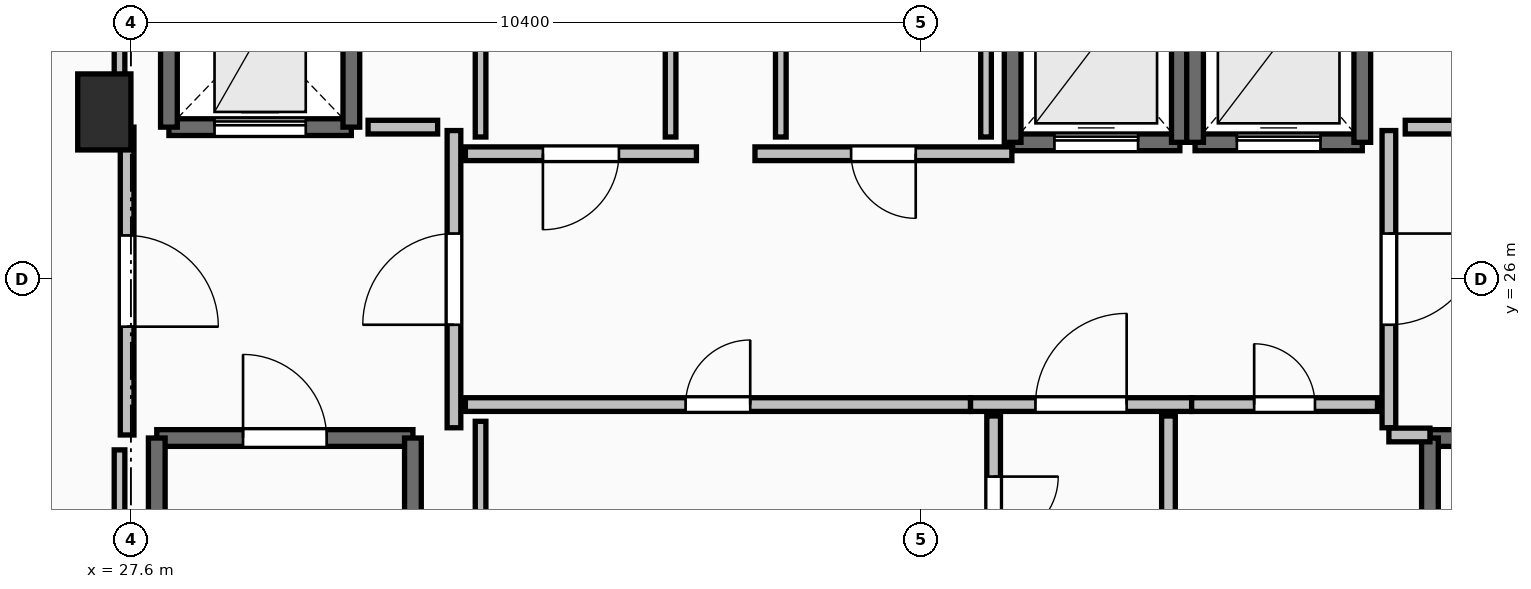
"""IFC4 building model, lengths in metres.
Left out: names, types, materials, properties, quantities, classifications, styles, units other than length and angle.
Written with IfcOpenShell. Run it as: python <this file> out.ifc"""

import sys

from ifc_helpers import new_model, si_unit, direction, frame, frame_2d, origin, origin_2d, place, context, subcontext, project, spatial, rectangle, extrude, element, fill, save


model = new_model("IFC4")
c1 = context("Model", 3, precision=1e-05, world=origin(), true_north=direction((0.0, 1.0)))
c2 = subcontext(c1, "Body", "Model", "MODEL_VIEW")
j1 = project(units=[si_unit("LENGTHUNIT", "METRE"), si_unit("PLANEANGLEUNIT", "RADIAN")], contexts=[c1])
p1 = place(None, origin())
s1 = spatial("IfcSite", under=j1, at=p1, CompositionType="ELEMENT")
p2 = place(p1, origin())
s2 = spatial("IfcBuilding", under=s1, at=p2, CompositionType="ELEMENT")
p3 = place(p2, frame((0.0, 0.0, 234.25)))
s3 = spatial("IfcBuildingStorey", under=s2, at=p3, CompositionType="ELEMENT", Elevation=234.25)
p4 = place(p3, frame((27.25, 28.2, 0.0), z_axis=(0.0, 0.0, 1.0), x_axis=(1.0, 0.0, 0.0)))
e1 = element("IfcColumn", 1, at=p4, inside=s3, PredefinedType="PILASTER", context=c2, shape_type="SweptSolid", body=[
    extrude(rectangle(XDim=0.7, YDim=1.0, at=origin_2d()), origin(), (0.0, 0.0, 1.0), 3.55),
])
p5 = place(p3, frame((27.94, 23.91, 0.0), z_axis=(0.0, 0.0, 1.0), x_axis=(1.0, 0.0, 0.0)))
e2 = element("IfcWall", 2, at=p5, inside=s3, PredefinedType="SOLIDWALL", context=c2, shape_type="SweptSolid", body=[
    extrude(rectangle(XDim=3.37, YDim=0.22, at=frame_2d((1.685, 0.0))), origin(), (0.0, 0.0, 1.0), 3.29),
])
p6 = place(p5, frame((1.135, 0.0, 0.0)))
e3 = element("IfcOpeningElement", 3, at=p6, cuts=e2, PredefinedType="OPENING", context=c2, shape_type="SweptSolid", body=[
    extrude(rectangle(XDim=1.1, YDim=2.15, at=frame_2d((0.55, 1.075))), frame((0.0, 0.125, 0.0), z_axis=(0.0, -1.0, 0.0), x_axis=(1.0, 0.0, 0.0)), (0.0, 0.0, 1.0), 0.25),
])
for number, where, z_axis, x_axis in (
    (4, (31.31, 23.91, 0.0), (0.0, 0.0, 1.0), (0.0, -1.0, 0.0)),
    (5, (27.94, 16.49, 0.0), (0.0, 0.0, 1.0), (0.0, 1.0, 0.0)),
):
    element("IfcWall", number, at=place(p3, frame(where, z_axis=z_axis, x_axis=x_axis)), inside=s3, PredefinedType="SOLIDWALL", context=c2, shape_type="SweptSolid", body=[
        extrude(rectangle(XDim=7.42, YDim=0.22, at=frame_2d((3.71, 0.0))), origin(), (0.0, 0.0, 1.0), 3.29),
    ])
p7 = place(p3, frame((44.69, 23.91, 0.0), z_axis=(0.0, 0.0, 1.0), x_axis=(1.0, 0.0, 0.0)))
e6 = element("IfcWall", 6, at=p7, inside=s3, PredefinedType="SOLIDWALL", context=c2, shape_type="SweptSolid", body=[
    extrude(rectangle(XDim=3.37, YDim=0.22, at=frame_2d((1.685, 0.0))), origin(), (0.0, 0.0, 1.0), 3.29),
])
p8 = place(p7, frame((1.135, 0.0, 0.0)))
e7 = element("IfcOpeningElement", 7, at=p8, cuts=e6, PredefinedType="OPENING", context=c2, shape_type="SweptSolid", body=[
    extrude(rectangle(XDim=1.1, YDim=2.15, at=frame_2d((0.55, 1.075))), frame((0.0, 0.125, 0.0), z_axis=(0.0, -1.0, 0.0), x_axis=(1.0, 0.0, 0.0)), (0.0, 0.0, 1.0), 0.25),
])
p9 = place(p3, frame((44.69, 16.49, 0.0), z_axis=(0.0, 0.0, 1.0), x_axis=(0.0, 1.0, 0.0)))
e8 = element("IfcWall", 8, at=p9, inside=s3, PredefinedType="SOLIDWALL", context=c2, shape_type="SweptSolid", body=[
    extrude(rectangle(XDim=7.42, YDim=0.22, at=frame_2d((3.71, 0.0))), origin(), (0.0, 0.0, 1.0), 3.29),
])
p10 = place(p3, frame((39.2, 27.8, 0.0), z_axis=(0.0, 0.0, 1.0), x_axis=(1.0, 0.0, 0.0)))
e9 = element("IfcWall", 9, at=p10, inside=s3, PredefinedType="SOLIDWALL", context=c2, shape_type="SweptSolid", body=[
    extrude(rectangle(XDim=2.2, YDim=0.22, at=frame_2d((1.1, 0.0))), origin(), (0.0, 0.0, 1.0), 3.29),
])
p11 = place(p10, frame((0.55, 0.0, 0.0)))
e10 = element("IfcOpeningElement", 10, at=p11, cuts=e9, PredefinedType="OPENING", context=c2, shape_type="SweptSolid", body=[
    extrude(rectangle(XDim=1.1, YDim=2.2, at=frame_2d((0.55, 1.1))), frame((0.0, 0.125, 0.0), z_axis=(0.0, -1.0, 0.0), x_axis=(1.0, 0.0, 0.0)), (0.0, 0.0, 1.0), 0.25),
])
for number, where, z_axis, x_axis in (
    (11, (41.4, 27.8, 0.0), (0.0, 0.0, 1.0), (0.0, 1.0, 0.0)),
    (12, (39.2, 30.4, 0.0), (0.0, 0.0, 1.0), (0.0, -1.0, 0.0)),
):
    element("IfcWall", number, at=place(p3, frame(where, z_axis=z_axis, x_axis=x_axis)), inside=s3, PredefinedType="SOLIDWALL", context=c2, shape_type="SweptSolid", body=[
        extrude(rectangle(XDim=2.6, YDim=0.22, at=frame_2d((1.3, 0.0))), origin(), (0.0, 0.0, 1.0), 3.29),
    ])
p12 = place(p3, frame((41.6, 27.8, 0.0), z_axis=(0.0, 0.0, 1.0), x_axis=(1.0, 0.0, 0.0)))
e13 = element("IfcWall", 13, at=p12, inside=s3, PredefinedType="SOLIDWALL", context=c2, shape_type="SweptSolid", body=[
    extrude(rectangle(XDim=2.2, YDim=0.22, at=frame_2d((1.1, 0.0))), origin(), (0.0, 0.0, 1.0), 3.29),
])
p13 = place(p12, frame((0.55, 0.0, 0.0)))
e14 = element("IfcOpeningElement", 14, at=p13, cuts=e13, PredefinedType="OPENING", context=c2, shape_type="SweptSolid", body=[
    extrude(rectangle(XDim=1.1, YDim=2.2, at=frame_2d((0.55, 1.1))), frame((0.0, 0.125, 0.0), z_axis=(0.0, -1.0, 0.0), x_axis=(1.0, 0.0, 0.0)), (0.0, 0.0, 1.0), 0.25),
])
for number, where, z_axis, x_axis in (
    (15, (43.8, 27.8, 0.0), (0.0, 0.0, 1.0), (0.0, 1.0, 0.0)),
    (16, (41.6, 30.4, 0.0), (0.0, 0.0, 1.0), (0.0, -1.0, 0.0)),
):
    element("IfcWall", number, at=place(p3, frame(where, z_axis=z_axis, x_axis=x_axis)), inside=s3, PredefinedType="SOLIDWALL", context=c2, shape_type="SweptSolid", body=[
        extrude(rectangle(XDim=2.6, YDim=0.22, at=frame_2d((1.3, 0.0))), origin(), (0.0, 0.0, 1.0), 3.29),
    ])
p14 = place(p3, frame((28.1, 28.0, 0.0), z_axis=(0.0, 0.0, 1.0), x_axis=(1.0, 0.0, 0.0)))
e17 = element("IfcWall", 17, at=p14, inside=s3, PredefinedType="SHEAR", context=c2, shape_type="SweptSolid", body=[
    extrude(rectangle(XDim=2.4, YDim=0.22, at=frame_2d((1.2, 0.0))), origin(), (0.0, 0.0, 1.0), 3.29),
])
p15 = place(p14, frame((0.6, 0.0, 0.0)))
e18 = element("IfcOpeningElement", 18, at=p15, cuts=e17, PredefinedType="OPENING", context=c2, shape_type="SweptSolid", body=[
    extrude(rectangle(XDim=1.2, YDim=2.2, at=frame_2d((0.6, 1.1))), frame((0.0, 0.125, 0.0), z_axis=(0.0, -1.0, 0.0), x_axis=(1.0, 0.0, 0.0)), (0.0, 0.0, 1.0), 0.25),
])
for number, where, z_axis, x_axis in (
    (19, (30.5, 28.0, 0.0), (0.0, 0.0, 1.0), (0.0, 1.0, 0.0)),
    (20, (28.1, 30.5, 0.0), (0.0, 0.0, 1.0), (0.0, -1.0, 0.0)),
):
    element("IfcWall", number, at=place(p3, frame(where, z_axis=z_axis, x_axis=x_axis)), inside=s3, PredefinedType="SHEAR", context=c2, shape_type="SweptSolid", body=[
        extrude(rectangle(XDim=2.5, YDim=0.22, at=frame_2d((1.25, 0.0))), origin(), (0.0, 0.0, 1.0), 3.29),
    ])
p16 = place(p3, frame((31.85, 24.045, 0.0), z_axis=(0.0, 0.0, 1.0), x_axis=(0.0, 1.0, 0.0)))
e21 = element("IfcWall", 21, at=p16, inside=s3, PredefinedType="PARTITIONING", context=c2, shape_type="SweptSolid", body=[
    extrude(rectangle(XDim=3.91, YDim=0.18, at=frame_2d((1.955, 0.0))), origin(), (0.0, 0.0, 1.0), 3.29),
])
p17 = place(p16, frame((1.355, 0.0, 0.0)))
e22 = element("IfcOpeningElement", 22, at=p17, cuts=e21, PredefinedType="OPENING", context=c2, shape_type="SweptSolid", body=[
    extrude(rectangle(XDim=1.2, YDim=2.15, at=frame_2d((0.6, 1.075))), frame((0.0, 0.105, 0.0), z_axis=(0.0, -1.0, 0.0), x_axis=(1.0, 0.0, 0.0)), (0.0, 0.0, 1.0), 0.21),
])
p18 = place(p3, frame((27.55, 28.0, 0.0), z_axis=(0.0, 0.0, 1.0), x_axis=(0.0, -1.0, 0.0)))
e23 = element("IfcWall", 23, at=p18, inside=s3, PredefinedType="PARTITIONING", context=c2, shape_type="SweptSolid", body=[
    extrude(rectangle(XDim=4.05, YDim=0.18, at=frame_2d((2.025, 0.0))), origin(), (0.0, 0.0, 1.0), 3.29),
])
p19 = place(p18, frame((1.425, 0.0, 0.0)))
e24 = element("IfcOpeningElement", 24, at=p19, cuts=e23, PredefinedType="OPENING", context=c2, shape_type="SweptSolid", body=[
    extrude(rectangle(XDim=1.2, YDim=2.15, at=frame_2d((0.6, 1.075))), frame((0.0, 0.105, 0.0), z_axis=(0.0, -1.0, 0.0), x_axis=(1.0, 0.0, 0.0)), (0.0, 0.0, 1.0), 0.21),
])
p20 = place(p3, frame((44.15, 27.955, 0.0), z_axis=(0.0, 0.0, 1.0), x_axis=(0.0, -1.0, 0.0)))
e25 = element("IfcWall", 25, at=p20, inside=s3, PredefinedType="PARTITIONING", context=c2, shape_type="SweptSolid", body=[
    extrude(rectangle(XDim=3.91, YDim=0.18, at=frame_2d((1.955, 0.0))), origin(), (0.0, 0.0, 1.0), 3.29),
])
p21 = place(p20, frame((1.355, 0.0, 0.0)))
e26 = element("IfcOpeningElement", 26, at=p21, cuts=e25, PredefinedType="OPENING", context=c2, shape_type="SweptSolid", body=[
    extrude(rectangle(XDim=1.2, YDim=2.15, at=frame_2d((0.6, 1.075))), frame((0.0, 0.105, 0.0), z_axis=(0.0, -1.0, 0.0), x_axis=(1.0, 0.0, 0.0)), (0.0, 0.0, 1.0), 0.21),
])
p22 = place(p3, frame((44.15, 23.95, 0.0), z_axis=(0.0, 0.0, 1.0), x_axis=(1.0, 0.0, 0.0)))
e27 = element("IfcWall", 27, at=p22, inside=s3, PredefinedType="PARTITIONING", context=c2, shape_type="SweptSolid", body=[
    extrude(rectangle(XDim=0.54, YDim=0.18, at=frame_2d((0.27, 0.0))), origin(), (0.0, 0.0, 1.0), 3.29),
])
p23 = place(p3, frame((38.645, 24.35, 0.0), z_axis=(0.0, 0.0, 1.0), x_axis=(1.0, 0.0, 0.0)))
e28 = element("IfcWall", 28, at=p23, inside=s3, PredefinedType="PARTITIONING", context=c2, shape_type="SweptSolid", body=[
    extrude(rectangle(XDim=2.91, YDim=0.18, at=frame_2d((1.455, 0.0))), origin(), (0.0, 0.0, 1.0), 3.29),
])
p24 = place(p23, frame((0.855, 0.0, 0.0)))
e29 = element("IfcOpeningElement", 29, at=p24, cuts=e28, PredefinedType="OPENING", context=c2, shape_type="SweptSolid", body=[
    extrude(rectangle(XDim=1.2, YDim=2.15, at=frame_2d((0.6, 1.075))), frame((0.0, 0.105, 0.0), z_axis=(0.0, -1.0, 0.0), x_axis=(1.0, 0.0, 0.0)), (0.0, 0.0, 1.0), 0.21),
])
p25 = place(p3, frame((41.555, 24.35, 0.0), z_axis=(0.0, 0.0, 1.0), x_axis=(1.0, 0.0, 0.0)))
e30 = element("IfcWall", 30, at=p25, inside=s3, PredefinedType="PARTITIONING", context=c2, shape_type="SweptSolid", body=[
    extrude(rectangle(XDim=2.445, YDim=0.18, at=frame_2d((1.223, 0.0))), origin(), (0.0, 0.0, 1.0), 3.29),
])
p26 = place(p25, frame((0.823, 0.0, 0.0)))
e31 = element("IfcOpeningElement", 31, at=p26, cuts=e30, PredefinedType="OPENING", context=c2, shape_type="SweptSolid", body=[
    extrude(rectangle(XDim=0.8, YDim=2.05, at=frame_2d((0.4, 1.025))), frame((0.0, 0.105, 0.0), z_axis=(0.0, -1.0, 0.0), x_axis=(1.0, 0.0, 0.0)), (0.0, 0.0, 1.0), 0.21),
])
p27 = place(p3, frame((35.04, 27.65, 0.0), z_axis=(0.0, 0.0, 1.0), x_axis=(-1.0, 0.0, 0.0)))
e32 = element("IfcWall", 32, at=p27, inside=s3, PredefinedType="PARTITIONING", context=c2, shape_type="SweptSolid", body=[
    extrude(rectangle(XDim=3.04, YDim=0.18, at=frame_2d((1.52, 0.0))), origin(), (0.0, 0.0, 1.0), 3.29),
])
p28 = place(p27, frame((1.02, 0.0, 0.0)))
e33 = element("IfcOpeningElement", 33, at=p28, cuts=e32, PredefinedType="OPENING", context=c2, shape_type="SweptSolid", body=[
    extrude(rectangle(XDim=1.0, YDim=2.15, at=frame_2d((0.5, 1.075))), frame((0.0, 0.105, 0.0), z_axis=(0.0, -1.0, 0.0), x_axis=(1.0, 0.0, 0.0)), (0.0, 0.0, 1.0), 0.21),
])
p29 = place(p3, frame((39.19, 27.65, 0.0), z_axis=(0.0, 0.0, 1.0), x_axis=(-1.0, 0.0, 0.0)))
e34 = element("IfcWall", 34, at=p29, inside=s3, PredefinedType="PARTITIONING", context=c2, shape_type="SweptSolid", body=[
    extrude(rectangle(XDim=3.38, YDim=0.18, at=frame_2d((1.69, 0.0))), origin(), (0.0, 0.0, 1.0), 3.29),
])
p30 = place(p29, frame((1.265, 0.0, 0.0)))
e35 = element("IfcOpeningElement", 35, at=p30, cuts=e34, PredefinedType="OPENING", context=c2, shape_type="SweptSolid", body=[
    extrude(rectangle(XDim=0.85, YDim=2.1, at=frame_2d((0.425, 1.05))), frame((0.0, 0.105, 0.0), z_axis=(0.0, -1.0, 0.0), x_axis=(1.0, 0.0, 0.0)), (0.0, 0.0, 1.0), 0.21),
])
p31 = place(p3, frame((32.0, 24.35, 0.0), z_axis=(0.0, 0.0, 1.0), x_axis=(1.0, 0.0, 0.0)))
e36 = element("IfcWall", 36, at=p31, inside=s3, PredefinedType="PARTITIONING", context=c2, shape_type="SweptSolid", body=[
    extrude(rectangle(XDim=6.645, YDim=0.18, at=frame_2d((3.323, 0.0))), origin(), (0.0, 0.0, 1.0), 3.29),
])
p32 = place(p31, frame((2.897, 0.0, 0.0)))
e37 = element("IfcOpeningElement", 37, at=p32, cuts=e36, PredefinedType="OPENING", context=c2, shape_type="SweptSolid", body=[
    extrude(rectangle(XDim=0.85, YDim=2.1, at=frame_2d((0.425, 1.05))), frame((0.0, 0.105, 0.0), z_axis=(0.0, -1.0, 0.0), x_axis=(1.0, 0.0, 0.0)), (0.0, 0.0, 1.0), 0.21),
])
p33 = place(p3, frame((41.25, 16.32, 0.0), z_axis=(0.0, 0.0, 1.0), x_axis=(0.0, 1.0, 0.0)))
e38 = element("IfcWall", 38, at=p33, inside=s3, PredefinedType="PARTITIONING", context=c2, shape_type="SweptSolid", body=[
    extrude(rectangle(XDim=7.88, YDim=0.18, at=frame_2d((3.94, 0.0))), origin(), (0.0, 0.0, 1.0), 2.482),
])
p34 = place(p33, frame((3.54, 0.0, 0.0)))
e39 = element("IfcOpeningElement", 39, at=p34, cuts=e38, PredefinedType="OPENING", context=c2, shape_type="SweptSolid", body=[
    extrude(rectangle(XDim=0.8, YDim=2.05, at=frame_2d((0.4, 1.025))), frame((0.0, 0.105, 0.0), z_axis=(0.0, -1.0, 0.0), x_axis=(1.0, 0.0, 0.0)), (0.0, 0.0, 1.0), 0.21),
])
p35 = place(p3, frame((38.95, 24.2, 0.0), z_axis=(0.0, 0.0, 1.0), x_axis=(0.0, -1.0, 0.0)))
e40 = element("IfcWall", 40, at=p35, inside=s3, PredefinedType="PARTITIONING", context=c2, shape_type="SweptSolid", body=[
    extrude(rectangle(XDim=2.445, YDim=0.18, at=frame_2d((1.223, 0.0))), origin(), (0.0, 0.0, 1.0), 2.482),
])
p36 = place(p35, frame((0.798, 0.0, 0.0)))
e41 = element("IfcOpeningElement", 41, at=p36, cuts=e40, PredefinedType="OPENING", context=c2, shape_type="SweptSolid", body=[
    extrude(rectangle(XDim=0.85, YDim=2.1, at=frame_2d((0.425, 1.05))), frame((0.0, 0.105, 0.0), z_axis=(0.0, -1.0, 0.0), x_axis=(1.0, 0.0, 0.0)), (0.0, 0.0, 1.0), 0.21),
])
for number, where, z_axis, x_axis in (
    (42, (31.635, 28.0, 0.0), (0.0, 0.0, 1.0), (-1.0, 0.0, 0.0)),
    (43, (45.28, 28.0, 0.0), (0.0, 0.0, 1.0), (-1.0, 0.0, 0.0)),
):
    element("IfcWall", number, at=place(p3, frame(where, z_axis=z_axis, x_axis=x_axis)), inside=s3, PredefinedType="PARTITIONING", context=c2, shape_type="SweptSolid", body=[
        extrude(rectangle(XDim=0.915, YDim=0.18, at=frame_2d((0.458, 0.0))), origin(), (0.0, 0.0, 1.0), 3.29),
    ])
for number, where, z_axis, x_axis in (
    (44, (32.2, 30.26, 0.0), (0.0, 0.0, 1.0), (0.0, -1.0, 0.0)),
    (45, (34.7, 27.87, 0.0), (0.0, 0.0, 1.0), (0.0, 1.0, 0.0)),
):
    element("IfcWall", number, at=place(p3, frame(where, z_axis=z_axis, x_axis=x_axis)), inside=s3, PredefinedType="PARTITIONING", context=c2, shape_type="SweptSolid", body=[
        extrude(rectangle(XDim=2.39, YDim=0.14, at=frame_2d((1.195, 0.0))), origin(), (0.0, 0.0, 1.0), 3.29),
    ])
p37 = place(p3, frame((36.15, 30.03, 0.0), z_axis=(0.0, 0.0, 1.0), x_axis=(0.0, -1.0, 0.0)))
e46 = element("IfcWall", 46, at=p37, inside=s3, PredefinedType="PARTITIONING", context=c2, shape_type="SweptSolid", body=[
    extrude(rectangle(XDim=2.16, YDim=0.14, at=frame_2d((1.08, 0.0))), origin(), (0.0, 0.0, 1.0), 3.29),
])
p38 = place(p3, frame((38.85, 27.87, 0.0), z_axis=(0.0, 0.0, 1.0), x_axis=(0.0, 1.0, 0.0)))
e47 = element("IfcWall", 47, at=p38, inside=s3, PredefinedType="PARTITIONING", context=c2, shape_type="SweptSolid", body=[
    extrude(rectangle(XDim=2.39, YDim=0.14, at=frame_2d((1.195, 0.0))), origin(), (0.0, 0.0, 1.0), 3.29),
])
p39 = place(p3, frame((32.2, 24.13, 0.0), z_axis=(0.0, 0.0, 1.0), x_axis=(0.0, -1.0, 0.0)))
e48 = element("IfcWall", 48, at=p39, inside=s3, PredefinedType="PARTITIONING", context=c2, shape_type="SweptSolid", body=[
    extrude(rectangle(XDim=2.46, YDim=0.14, at=frame_2d((1.23, 0.0))), origin(), (0.0, 0.0, 1.0), 2.482),
])
p40 = place(p3, frame((27.45, 33.45, 0.0), z_axis=(0.0, 0.0, 1.0), x_axis=(0.0, -1.0, 0.0)))
e49 = element("IfcWall", 49, at=p40, inside=s3, PredefinedType="PARTITIONING", context=c2, shape_type="SweptSolid", body=[
    extrude(rectangle(XDim=5.254, YDim=0.14, at=frame_2d((2.627, 0.0))), origin(), (0.0, 0.0, 1.0), 2.482),
])
p41 = place(p3, frame((27.45, 23.754, 0.0), z_axis=(0.0, 0.0, 1.0), x_axis=(0.0, -1.0, 0.0)))
e50 = element("IfcWall", 50, at=p41, inside=s3, PredefinedType="PARTITIONING", context=c2, shape_type="SweptSolid", body=[
    extrude(rectangle(XDim=7.514, YDim=0.14, at=frame_2d((3.757, 0.0))), origin(), (0.0, 0.0, 1.0), 2.482),
])
p42 = place(p6, origin())
e51 = element("IfcDoor", 51, at=p42, inside=s3, OperationType="SINGLE_SWING_LEFT", PredefinedType="DOOR", context=c2, shape_type="SweptSolid", body=[
    extrude(rectangle(XDim=1.1, YDim=2.15, at=frame_2d((0.55, 1.075))), frame((0.0, 0.025, 0.0), z_axis=(0.0, -1.0, 0.0), x_axis=(1.0, 0.0, 0.0)), (0.0, 0.0, 1.0), 0.05),
])
fill(e3, e51)
p43 = place(p11, origin())
e52 = element("IfcDoor", 52, at=p43, inside=s3, OperationType="SLIDING_TO_LEFT", PredefinedType="DOOR", context=c2, shape_type="SweptSolid", body=[
    extrude(rectangle(XDim=1.1, YDim=2.2, at=frame_2d((0.55, 1.1))), frame((0.0, 0.025, 0.0), z_axis=(0.0, -1.0, 0.0), x_axis=(1.0, 0.0, 0.0)), (0.0, 0.0, 1.0), 0.05),
])
fill(e10, e52)
p44 = place(p13, origin())
e53 = element("IfcDoor", 53, at=p44, inside=s3, OperationType="SLIDING_TO_LEFT", PredefinedType="DOOR", context=c2, shape_type="SweptSolid", body=[
    extrude(rectangle(XDim=1.1, YDim=2.2, at=frame_2d((0.55, 1.1))), frame((0.0, 0.025, 0.0), z_axis=(0.0, -1.0, 0.0), x_axis=(1.0, 0.0, 0.0)), (0.0, 0.0, 1.0), 0.05),
])
fill(e14, e53)
p45 = place(p15, origin())
e54 = element("IfcDoor", 54, at=p45, inside=s3, OperationType="SLIDING_TO_LEFT", PredefinedType="DOOR", context=c2, shape_type="SweptSolid", body=[
    extrude(rectangle(XDim=1.2, YDim=2.2, at=frame_2d((0.6, 1.1))), frame((0.0, 0.025, 0.0), z_axis=(0.0, -1.0, 0.0), x_axis=(1.0, 0.0, 0.0)), (0.0, 0.0, 1.0), 0.05),
])
fill(e18, e54)
p46 = place(p17, origin())
e55 = element("IfcDoor", 55, at=p46, inside=s3, OperationType="SINGLE_SWING_LEFT", PredefinedType="DOOR", context=c2, shape_type="SweptSolid", body=[
    extrude(rectangle(XDim=1.2, YDim=2.15, at=frame_2d((0.6, 1.075))), frame((0.0, 0.025, 0.0), z_axis=(0.0, -1.0, 0.0), x_axis=(1.0, 0.0, 0.0)), (0.0, 0.0, 1.0), 0.05),
])
fill(e22, e55)
p47 = place(p19, origin())
e56 = element("IfcDoor", 56, at=p47, inside=s3, OperationType="SINGLE_SWING_RIGHT", PredefinedType="DOOR", context=c2, shape_type="SweptSolid", body=[
    extrude(rectangle(XDim=1.2, YDim=2.15, at=frame_2d((0.6, 1.075))), frame((0.0, 0.025, 0.0), z_axis=(0.0, -1.0, 0.0), x_axis=(1.0, 0.0, 0.0)), (0.0, 0.0, 1.0), 0.05),
])
fill(e24, e56)
p48 = place(p21, origin())
e57 = element("IfcDoor", 57, at=p48, inside=s3, OperationType="SINGLE_SWING_LEFT", PredefinedType="DOOR", context=c2, shape_type="SweptSolid", body=[
    extrude(rectangle(XDim=1.2, YDim=2.15, at=frame_2d((0.6, 1.075))), frame((0.0, 0.025, 0.0), z_axis=(0.0, -1.0, 0.0), x_axis=(1.0, 0.0, 0.0)), (0.0, 0.0, 1.0), 0.05),
])
fill(e26, e57)
p49 = place(p24, origin())
e58 = element("IfcDoor", 58, at=p49, inside=s3, OperationType="SINGLE_SWING_RIGHT", PredefinedType="DOOR", context=c2, shape_type="SweptSolid", body=[
    extrude(rectangle(XDim=1.2, YDim=2.15, at=frame_2d((0.6, 1.075))), frame((0.0, 0.025, 0.0), z_axis=(0.0, -1.0, 0.0), x_axis=(1.0, 0.0, 0.0)), (0.0, 0.0, 1.0), 0.05),
])
fill(e29, e58)
p50 = place(p26, origin())
e59 = element("IfcDoor", 59, at=p50, inside=s3, OperationType="SINGLE_SWING_LEFT", PredefinedType="DOOR", context=c2, shape_type="SweptSolid", body=[
    extrude(rectangle(XDim=0.8, YDim=2.05, at=frame_2d((0.4, 1.025))), frame((0.0, 0.025, 0.0), z_axis=(0.0, -1.0, 0.0), x_axis=(1.0, 0.0, 0.0)), (0.0, 0.0, 1.0), 0.05),
])
fill(e31, e59)
p51 = place(p28, origin())
e60 = element("IfcDoor", 60, at=p51, inside=s3, OperationType="SINGLE_SWING_RIGHT", PredefinedType="DOOR", context=c2, shape_type="SweptSolid", body=[
    extrude(rectangle(XDim=1.0, YDim=2.15, at=frame_2d((0.5, 1.075))), frame((0.0, 0.025, 0.0), z_axis=(0.0, -1.0, 0.0), x_axis=(1.0, 0.0, 0.0)), (0.0, 0.0, 1.0), 0.05),
])
fill(e33, e60)
p52 = place(p30, origin())
e61 = element("IfcDoor", 61, at=p52, inside=s3, OperationType="SINGLE_SWING_LEFT", PredefinedType="DOOR", context=c2, shape_type="SweptSolid", body=[
    extrude(rectangle(XDim=0.85, YDim=2.1, at=frame_2d((0.425, 1.05))), frame((0.0, 0.025, 0.0), z_axis=(0.0, -1.0, 0.0), x_axis=(1.0, 0.0, 0.0)), (0.0, 0.0, 1.0), 0.05),
])
fill(e35, e61)
p53 = place(p32, origin())
e62 = element("IfcDoor", 62, at=p53, inside=s3, OperationType="SINGLE_SWING_RIGHT", PredefinedType="DOOR", context=c2, shape_type="SweptSolid", body=[
    extrude(rectangle(XDim=0.85, YDim=2.1, at=frame_2d((0.425, 1.05))), frame((0.0, 0.025, 0.0), z_axis=(0.0, -1.0, 0.0), x_axis=(1.0, 0.0, 0.0)), (0.0, 0.0, 1.0), 0.05),
])
fill(e37, e62)
p54 = place(p36, origin())
e63 = element("IfcDoor", 63, at=p54, inside=s3, OperationType="SINGLE_SWING_LEFT", PredefinedType="DOOR", context=c2, shape_type="SweptSolid", body=[
    extrude(rectangle(XDim=0.85, YDim=2.1, at=frame_2d((0.425, 1.05))), frame((0.0, 0.025, 0.0), z_axis=(0.0, -1.0, 0.0), x_axis=(1.0, 0.0, 0.0)), (0.0, 0.0, 1.0), 0.05),
])
fill(e41, e63)
save(model, sys.argv[1])
